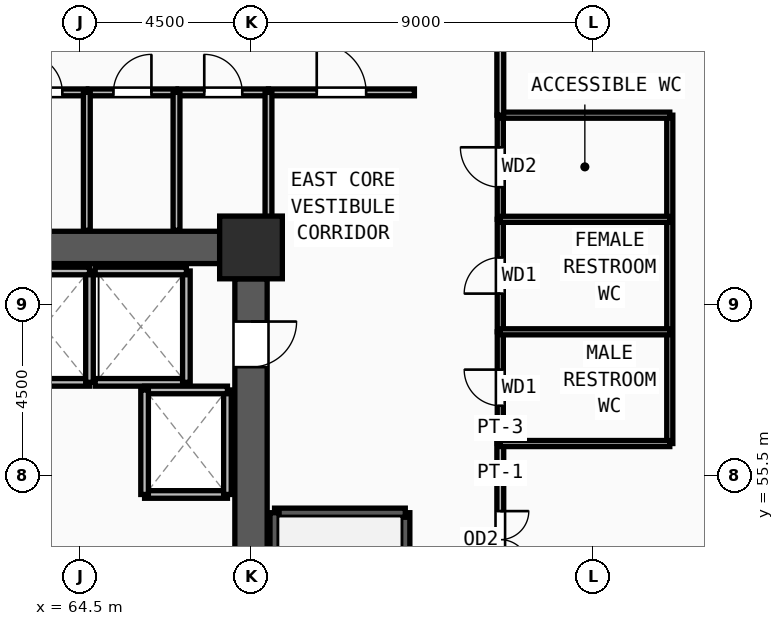
"""IFC4 building model, lengths in metres.
Left out: names, types, materials, properties, quantities, classifications, styles, units other than length and angle.
Written with IfcOpenShell. Run it as: python <this file> out.ifc"""

import sys

from ifc_helpers import new_model, si_unit, direction, frame, frame_2d, origin, origin_2d, place, context, subcontext, project, spatial, rectangle, extrude, source, transform, mapped, element, fill, save


model = new_model("IFC4")
c1 = context("Model", 3, precision=1e-05, world=origin(), true_north=direction((0.0, 1.0)))
c2 = subcontext(c1, "Body", "Model", "MODEL_VIEW")
j1 = project(units=[si_unit("LENGTHUNIT", "METRE"), si_unit("PLANEANGLEUNIT", "RADIAN")], contexts=[c1])
p1 = place(None, origin())
s1 = spatial("IfcSite", under=j1, at=p1, CompositionType="ELEMENT")
p2 = place(p1, origin())
s2 = spatial("IfcBuilding", under=s1, at=p2, CompositionType="ELEMENT")
p3 = place(p2, frame((0.0, 0.0, 85.5)))
s3 = spatial("IfcBuildingStorey", under=s2, at=p3, CompositionType="ELEMENT", Elevation=85.5)
m1 = source(origin(), c2, "Body", "SweptSolid", [
    extrude(rectangle(XDim=1.65, YDim=1.65, at=origin_2d()), origin(), (0.0, 0.0, 1.0), 3.75),
])
p4 = place(p3, frame((69.0, 61.5, 0.0), z_axis=(0.0, 0.0, 1.0), x_axis=(1.0, 0.0, 0.0)))
e1 = element("IfcColumn", 1, at=p4, inside=s3, PredefinedType="COLUMN", context=c2, shape_type="MappedRepresentation", body=[
    mapped(m1, transform((0.0, 0.0, 0.0), x_axis=(1.0, 0.0, 0.0), y_axis=(0.0, 1.0, 0.0), z_axis=(0.0, 0.0, 1.0), scale=1.0)),
])
p5 = place(p3, frame((60.825, 61.5, 0.0), z_axis=(0.0, 0.0, 1.0), x_axis=(1.0, 0.0, 0.0)))
e2 = element("IfcWall", 2, at=p5, inside=s3, PredefinedType="SHEAR", context=c2, shape_type="SweptSolid", body=[
    extrude(rectangle(XDim=7.35, YDim=0.85, at=frame_2d((3.675, 0.0))), origin(), (0.0, 0.0, 1.0), 3.57),
])
p6 = place(p3, frame((69.0, 60.675, 0.0), z_axis=(0.0, 0.0, 1.0), x_axis=(0.0, -1.0, 0.0)))
e3 = element("IfcWall", 3, at=p6, inside=s3, PredefinedType="SHEAR", context=c2, shape_type="SweptSolid", body=[
    extrude(rectangle(XDim=13.35, YDim=0.85, at=frame_2d((6.675, 0.0))), origin(), (0.0, 0.0, 1.0), 3.57),
])
m2 = source(origin(), c2, "Body", "SweptSolid", [
    extrude(rectangle(XDim=1.2, YDim=2.2, at=frame_2d((0.6, 1.1))), frame((0.0, 0.435, 0.0), z_axis=(0.0, -1.0, 0.0), x_axis=(1.0, 0.0, 0.0)), (0.0, 0.0, 1.0), 0.87),
])
p7 = place(p6, frame((1.125, 0.0, 0.0)))
e4 = element("IfcOpeningElement", 4, at=p7, cuts=e3, PredefinedType="OPENING", context=c2, shape_type="MappedRepresentation", body=[
    mapped(m2, transform((0.0, 0.0, 0.0), x_axis=(1.0, 0.0, 0.0), y_axis=(0.0, 1.0, 0.0), z_axis=(0.0, 0.0, 1.0), scale=1.0)),
])
p8 = place(p3, frame((73.06, 46.7, 0.0), z_axis=(0.0, 0.0, 1.0), x_axis=(0.0, 1.0, 0.0)))
e5 = element("IfcWall", 5, at=p8, inside=s3, PredefinedType="SOLIDWALL", context=c2, shape_type="SweptSolid", body=[
    extrude(rectangle(XDim=7.82, YDim=0.24, at=frame_2d((3.91, 0.0))), origin(), (0.0, 0.0, 1.0), 3.57),
])
m3 = source(origin(), c2, "Body", "SweptSolid", [
    extrude(rectangle(XDim=1.2, YDim=2.2, at=frame_2d((0.6, 1.1))), frame((0.0, 0.13, 0.0), z_axis=(0.0, -1.0, 0.0), x_axis=(1.0, 0.0, 0.0)), (0.0, 0.0, 1.0), 0.26),
])
p9 = place(p8, frame((0.32, 0.0, 0.0)))
e6 = element("IfcOpeningElement", 6, at=p9, cuts=e5, PredefinedType="OPENING", context=c2, shape_type="MappedRepresentation", body=[
    mapped(m3, transform((0.0, 0.0, 0.0), x_axis=(1.0, 0.0, 0.0), y_axis=(0.0, 1.0, 0.0), z_axis=(0.0, 0.0, 1.0), scale=1.0)),
])
p10 = place(p3, frame((73.06, 54.52, 0.0), z_axis=(0.0, 0.0, 1.0), x_axis=(-1.0, 0.0, 0.0)))
e7 = element("IfcWall", 7, at=p10, inside=s3, PredefinedType="SOLIDWALL", context=c2, shape_type="SweptSolid", body=[
    extrude(rectangle(XDim=3.44, YDim=0.24, at=frame_2d((1.72, 0.0))), origin(), (0.0, 0.0, 1.0), 3.57),
])
p11 = place(p3, frame((69.62, 54.52, 0.0), z_axis=(0.0, 0.0, 1.0), x_axis=(0.0, -1.0, 0.0)))
e8 = element("IfcWall", 8, at=p11, inside=s3, PredefinedType="SOLIDWALL", context=c2, shape_type="SweptSolid", body=[
    extrude(rectangle(XDim=7.82, YDim=0.24, at=frame_2d((3.91, 0.0))), origin(), (0.0, 0.0, 1.0), 3.57),
])
p12 = place(p3, frame((62.35, 57.95, 0.0), z_axis=(0.0, 0.0, 1.0), x_axis=(1.0, 0.0, 0.0)))
e9 = element("IfcWall", 9, at=p12, inside=s3, PredefinedType="SOLIDWALL", context=c2, shape_type="SweptSolid", body=[
    extrude(rectangle(XDim=2.4, YDim=0.2, at=frame_2d((1.2, 0.0))), origin(), (0.0, 0.0, 1.0), 3.57),
])
p13 = place(p3, frame((64.75, 57.95, 0.0), z_axis=(0.0, 0.0, 1.0), x_axis=(0.0, 1.0, 0.0)))
e10 = element("IfcWall", 10, at=p13, inside=s3, PredefinedType="SOLIDWALL", context=c2, shape_type="SweptSolid", body=[
    extrude(rectangle(XDim=2.93, YDim=0.2, at=frame_2d((1.465, 0.0))), origin(), (0.0, 0.0, 1.0), 3.57),
])
p14 = place(p3, frame((64.75, 60.88, 0.0), z_axis=(0.0, 0.0, 1.0), x_axis=(-1.0, 0.0, 0.0)))
e11 = element("IfcWall", 11, at=p14, inside=s3, PredefinedType="SOLIDWALL", context=c2, shape_type="SweptSolid", body=[
    extrude(rectangle(XDim=2.4, YDim=0.2, at=frame_2d((1.2, 0.0))), origin(), (0.0, 0.0, 1.0), 3.57),
])
p15 = place(p3, frame((64.9, 57.95, 0.0), z_axis=(0.0, 0.0, 1.0), x_axis=(1.0, 0.0, 0.0)))
e12 = element("IfcWall", 12, at=p15, inside=s3, PredefinedType="SOLIDWALL", context=c2, shape_type="SweptSolid", body=[
    extrude(rectangle(XDim=2.4, YDim=0.2, at=frame_2d((1.2, 0.0))), origin(), (0.0, 0.0, 1.0), 3.57),
])
p16 = place(p3, frame((67.3, 57.95, 0.0), z_axis=(0.0, 0.0, 1.0), x_axis=(0.0, 1.0, 0.0)))
e13 = element("IfcWall", 13, at=p16, inside=s3, PredefinedType="SOLIDWALL", context=c2, shape_type="SweptSolid", body=[
    extrude(rectangle(XDim=2.93, YDim=0.2, at=frame_2d((1.465, 0.0))), origin(), (0.0, 0.0, 1.0), 3.57),
])
p17 = place(p3, frame((67.3, 60.88, 0.0), z_axis=(0.0, 0.0, 1.0), x_axis=(-1.0, 0.0, 0.0)))
e14 = element("IfcWall", 14, at=p17, inside=s3, PredefinedType="SOLIDWALL", context=c2, shape_type="SweptSolid", body=[
    extrude(rectangle(XDim=2.4, YDim=0.2, at=frame_2d((1.2, 0.0))), origin(), (0.0, 0.0, 1.0), 3.57),
])
p18 = place(p3, frame((66.2, 55.0, 0.0), z_axis=(0.0, 0.0, 1.0), x_axis=(1.0, 0.0, 0.0)))
e15 = element("IfcWall", 15, at=p18, inside=s3, PredefinedType="SOLIDWALL", context=c2, shape_type="SweptSolid", body=[
    extrude(rectangle(XDim=2.18, YDim=0.2, at=frame_2d((1.09, 0.0))), origin(), (0.0, 0.0, 1.0), 3.57),
])
p19 = place(p3, frame((68.38, 55.0, 0.0), z_axis=(0.0, 0.0, 1.0), x_axis=(0.0, 1.0, 0.0)))
e16 = element("IfcWall", 16, at=p19, inside=s3, PredefinedType="SOLIDWALL", context=c2, shape_type="SweptSolid", body=[
    extrude(rectangle(XDim=2.75, YDim=0.2, at=frame_2d((1.375, 0.0))), origin(), (0.0, 0.0, 1.0), 3.57),
])
p20 = place(p3, frame((68.38, 57.75, 0.0), z_axis=(0.0, 0.0, 1.0), x_axis=(-1.0, 0.0, 0.0)))
e17 = element("IfcWall", 17, at=p20, inside=s3, PredefinedType="SOLIDWALL", context=c2, shape_type="SweptSolid", body=[
    extrude(rectangle(XDim=2.18, YDim=0.2, at=frame_2d((1.09, 0.0))), origin(), (0.0, 0.0, 1.0), 3.57),
])
p21 = place(p3, frame((66.2, 57.75, 0.0), z_axis=(0.0, 0.0, 1.0), x_axis=(0.0, -1.0, 0.0)))
e18 = element("IfcWall", 18, at=p21, inside=s3, PredefinedType="SOLIDWALL", context=c2, shape_type="SweptSolid", body=[
    extrude(rectangle(XDim=2.75, YDim=0.2, at=frame_2d((1.375, 0.0))), origin(), (0.0, 0.0, 1.0), 3.57),
])
p22 = place(p3, frame((75.56, 56.34, 0.0), z_axis=(0.0, 0.0, 1.0), x_axis=(0.0, 1.0, 0.0)))
e19 = element("IfcWall", 19, at=p22, inside=s3, PredefinedType="PARTITIONING", context=c2, shape_type="SweptSolid", body=[
    extrude(rectangle(XDim=2.94, YDim=0.16, at=frame_2d((1.47, 0.0))), origin(), (0.0, 0.0, 1.0), 3.57),
])
m4 = source(origin(), c2, "Body", "SweptSolid", [
    extrude(rectangle(XDim=0.95, YDim=2.15, at=frame_2d((0.475, 1.075))), frame((0.0, 0.09, 0.0), z_axis=(0.0, -1.0, 0.0), x_axis=(1.0, 0.0, 0.0)), (0.0, 0.0, 1.0), 0.18),
])
p23 = place(p22, frame((0.995, 0.0, 0.0)))
e20 = element("IfcOpeningElement", 20, at=p23, cuts=e19, PredefinedType="OPENING", context=c2, shape_type="MappedRepresentation", body=[
    mapped(m4, transform((0.0, 0.0, 0.0), x_axis=(1.0, 0.0, 0.0), y_axis=(0.0, 1.0, 0.0), z_axis=(0.0, 0.0, 1.0), scale=1.0)),
])
p24 = place(p3, frame((75.56, 59.28, 0.0), z_axis=(0.0, 0.0, 1.0), x_axis=(0.0, 1.0, 0.0)))
e21 = element("IfcWall", 21, at=p24, inside=s3, PredefinedType="PARTITIONING", context=c2, shape_type="SweptSolid", body=[
    extrude(rectangle(XDim=2.96, YDim=0.16, at=frame_2d((1.48, 0.0))), origin(), (0.0, 0.0, 1.0), 3.57),
])
p25 = place(p24, frame((1.005, 0.0, 0.0)))
e22 = element("IfcOpeningElement", 22, at=p25, cuts=e21, PredefinedType="OPENING", context=c2, shape_type="MappedRepresentation", body=[
    mapped(m4, transform((0.0, 0.0, 0.0), x_axis=(1.0, 0.0, 0.0), y_axis=(0.0, 1.0, 0.0), z_axis=(0.0, 0.0, 1.0), scale=1.0)),
])
p26 = place(p3, frame((75.56, 62.24, 0.0), z_axis=(0.0, 0.0, 1.0), x_axis=(0.0, 1.0, 0.0)))
e23 = element("IfcWall", 23, at=p26, inside=s3, PredefinedType="PARTITIONING", context=c2, shape_type="SweptSolid", body=[
    extrude(rectangle(XDim=2.74, YDim=0.16, at=frame_2d((1.37, 0.0))), origin(), (0.0, 0.0, 1.0), 3.57),
])
m5 = source(origin(), c2, "Body", "SweptSolid", [
    extrude(rectangle(XDim=1.05, YDim=2.15, at=frame_2d((0.525, 1.075))), frame((0.0, 0.09, 0.0), z_axis=(0.0, -1.0, 0.0), x_axis=(1.0, 0.0, 0.0)), (0.0, 0.0, 1.0), 0.18),
])
p27 = place(p26, frame((0.845, 0.0, 0.0)))
e24 = element("IfcOpeningElement", 24, at=p27, cuts=e23, PredefinedType="OPENING", context=c2, shape_type="MappedRepresentation", body=[
    mapped(m5, transform((0.0, 0.0, 0.0), x_axis=(1.0, 0.0, 0.0), y_axis=(0.0, 1.0, 0.0), z_axis=(0.0, 0.0, 1.0), scale=1.0)),
])
p28 = place(p3, frame((62.39, 65.58, 0.0), z_axis=(0.0, 0.0, 1.0), x_axis=(1.0, 0.0, 0.0)))
e25 = element("IfcWall", 25, at=p28, inside=s3, PredefinedType="PARTITIONING", context=c2, shape_type="SweptSolid", body=[
    extrude(rectangle(XDim=2.29, YDim=0.18, at=frame_2d((1.145, 0.0))), origin(), (0.0, 0.0, 1.0), 3.57),
])
m6 = source(origin(), c2, "Body", "SweptSolid", [
    extrude(rectangle(XDim=1.0, YDim=2.2, at=frame_2d((0.5, 1.1))), frame((0.0, 0.1, 0.0), z_axis=(0.0, -1.0, 0.0), x_axis=(1.0, 0.0, 0.0)), (0.0, 0.0, 1.0), 0.2),
])
p29 = place(p28, frame((0.645, 0.0, 0.0)))
e26 = element("IfcOpeningElement", 26, at=p29, cuts=e25, PredefinedType="OPENING", context=c2, shape_type="MappedRepresentation", body=[
    mapped(m6, transform((0.0, 0.0, 0.0), x_axis=(1.0, 0.0, 0.0), y_axis=(0.0, 1.0, 0.0), z_axis=(0.0, 0.0, 1.0), scale=1.0)),
])
p30 = place(p3, frame((64.72, 65.58, 0.0), z_axis=(0.0, 0.0, 1.0), x_axis=(1.0, 0.0, 0.0)))
e27 = element("IfcWall", 27, at=p30, inside=s3, PredefinedType="PARTITIONING", context=c2, shape_type="SweptSolid", body=[
    extrude(rectangle(XDim=2.32, YDim=0.18, at=frame_2d((1.16, 0.0))), origin(), (0.0, 0.0, 1.0), 3.57),
])
p31 = place(p30, frame((0.66, 0.0, 0.0)))
e28 = element("IfcOpeningElement", 28, at=p31, cuts=e27, PredefinedType="OPENING", context=c2, shape_type="MappedRepresentation", body=[
    mapped(m6, transform((0.0, 0.0, 0.0), x_axis=(1.0, 0.0, 0.0), y_axis=(0.0, 1.0, 0.0), z_axis=(0.0, 0.0, 1.0), scale=1.0)),
])
p32 = place(p3, frame((67.08, 65.58, 0.0), z_axis=(0.0, 0.0, 1.0), x_axis=(1.0, 0.0, 0.0)))
e29 = element("IfcWall", 29, at=p32, inside=s3, PredefinedType="PARTITIONING", context=c2, shape_type="SweptSolid", body=[
    extrude(rectangle(XDim=2.38, YDim=0.18, at=frame_2d((1.19, 0.0))), origin(), (0.0, 0.0, 1.0), 3.57),
])
p33 = place(p32, frame((0.69, 0.0, 0.0)))
e30 = element("IfcOpeningElement", 30, at=p33, cuts=e29, PredefinedType="OPENING", context=c2, shape_type="MappedRepresentation", body=[
    mapped(m6, transform((0.0, 0.0, 0.0), x_axis=(1.0, 0.0, 0.0), y_axis=(0.0, 1.0, 0.0), z_axis=(0.0, 0.0, 1.0), scale=1.0)),
])
p34 = place(p3, frame((69.46, 65.58, 0.0), z_axis=(0.0, 0.0, 1.0), x_axis=(1.0, 0.0, 0.0)))
e31 = element("IfcWall", 31, at=p34, inside=s3, PredefinedType="PARTITIONING", context=c2, shape_type="SweptSolid", body=[
    extrude(rectangle(XDim=3.84, YDim=0.18, at=frame_2d((1.92, 0.0))), origin(), (0.0, 0.0, 1.0), 3.57),
])
m7 = source(origin(), c2, "Body", "SweptSolid", [
    extrude(rectangle(XDim=1.3, YDim=2.2, at=frame_2d((0.65, 1.1))), frame((0.0, 0.1, 0.0), z_axis=(0.0, -1.0, 0.0), x_axis=(1.0, 0.0, 0.0)), (0.0, 0.0, 1.0), 0.2),
])
p35 = place(p34, frame((1.27, 0.0, 0.0)))
e32 = element("IfcOpeningElement", 32, at=p35, cuts=e31, PredefinedType="OPENING", context=c2, shape_type="MappedRepresentation", body=[
    mapped(m7, transform((0.0, 0.0, 0.0), x_axis=(1.0, 0.0, 0.0), y_axis=(0.0, 1.0, 0.0), z_axis=(0.0, 0.0, 1.0), scale=1.0)),
])
p36 = place(p3, frame((75.56, 56.34, 0.0), z_axis=(0.0, 0.0, 1.0), x_axis=(0.0, -1.0, 0.0)))
e33 = element("IfcWall", 33, at=p36, inside=s3, PredefinedType="PARTITIONING", context=c2, shape_type="SweptSolid", body=[
    extrude(rectangle(XDim=5.055, YDim=0.18, at=frame_2d((2.528, 0.0))), origin(), (0.0, 0.0, 1.0), 3.57),
])
m8 = source(origin(), c2, "Body", "SweptSolid", [
    extrude(rectangle(XDim=1.5, YDim=2.2, at=frame_2d((0.75, 1.1))), frame((0.0, 0.1, 0.0), z_axis=(0.0, -1.0, 0.0), x_axis=(1.0, 0.0, 0.0)), (0.0, 0.0, 1.0), 0.2),
])
p37 = place(p36, frame((1.778, 0.0, 0.0)))
e34 = element("IfcOpeningElement", 34, at=p37, cuts=e33, PredefinedType="OPENING", context=c2, shape_type="MappedRepresentation", body=[
    mapped(m8, transform((0.0, 0.0, 0.0), x_axis=(1.0, 0.0, 0.0), y_axis=(0.0, 1.0, 0.0), z_axis=(0.0, 0.0, 1.0), scale=1.0)),
])
p38 = place(p3, frame((80.02, 56.34, 0.0), z_axis=(0.0, 0.0, 1.0), x_axis=(0.0, 1.0, 0.0)))
e35 = element("IfcWall", 35, at=p38, inside=s3, PredefinedType="PARTITIONING", context=c2, shape_type="SweptSolid", body=[
    extrude(rectangle(XDim=8.64, YDim=0.16, at=frame_2d((4.32, 0.0))), origin(), (0.0, 0.0, 1.0), 3.57),
])
for number, where, z_axis, x_axis in (
    (36, (75.56, 56.34, 0.0), (0.0, 0.0, 1.0), (1.0, 0.0, 0.0)),
    (37, (75.56, 59.28, 0.0), (0.0, 0.0, 1.0), (1.0, 0.0, 0.0)),
    (38, (75.56, 62.24, 0.0), (0.0, 0.0, 1.0), (1.0, 0.0, 0.0)),
    (39, (75.56, 64.98, 0.0), (0.0, 0.0, 1.0), (1.0, 0.0, 0.0)),
):
    element("IfcWall", number, at=place(p3, frame(where, z_axis=z_axis, x_axis=x_axis)), inside=s3, PredefinedType="PARTITIONING", context=c2, shape_type="SweptSolid", body=[
        extrude(rectangle(XDim=4.46, YDim=0.16, at=frame_2d((2.23, 0.0))), origin(), (0.0, 0.0, 1.0), 3.57),
    ])
for number, where, z_axis, x_axis in (
    (40, (64.68, 61.95, 0.0), (0.0, 0.0, 1.0), (0.0, 1.0, 0.0)),
    (41, (67.04, 61.95, 0.0), (0.0, 0.0, 1.0), (0.0, 1.0, 0.0)),
    (42, (69.46, 61.95, 0.0), (0.0, 0.0, 1.0), (0.0, 1.0, 0.0)),
):
    element("IfcWall", number, at=place(p3, frame(where, z_axis=z_axis, x_axis=x_axis)), inside=s3, PredefinedType="PARTITIONING", context=c2, shape_type="SweptSolid", body=[
        extrude(rectangle(XDim=3.63, YDim=0.18, at=frame_2d((1.815, 0.0))), origin(), (0.0, 0.0, 1.0), 3.57),
    ])
p39 = place(p3, frame((75.56, 67.215, 0.0), z_axis=(0.0, 0.0, 1.0), x_axis=(0.0, -1.0, 0.0)))
e43 = element("IfcWall", 43, at=p39, inside=s3, PredefinedType="PARTITIONING", context=c2, shape_type="SweptSolid", body=[
    extrude(rectangle(XDim=2.235, YDim=0.18, at=frame_2d((1.118, 0.0))), origin(), (0.0, 0.0, 1.0), 3.57),
])
m9 = source(origin(), c2, "Body", "SweptSolid", [
    extrude(rectangle(XDim=1.2, YDim=2.2, at=frame_2d((0.6, 1.1))), frame((0.0, 0.025, 0.0), z_axis=(0.0, -1.0, 0.0), x_axis=(1.0, 0.0, 0.0)), (0.0, 0.0, 1.0), 0.05),
])
p40 = place(p7, origin())
e44 = element("IfcDoor", 44, at=p40, inside=s3, OperationType="SINGLE_SWING_LEFT", PredefinedType="DOOR", context=c2, shape_type="MappedRepresentation", body=[
    mapped(m9, transform((0.0, 0.0, 0.0), x_axis=(1.0, 0.0, 0.0), y_axis=(0.0, 1.0, 0.0), z_axis=(0.0, 0.0, 1.0), scale=1.0)),
])
fill(e4, e44)
m10 = source(origin(), c2, "Body", "SweptSolid", [
    extrude(rectangle(XDim=0.95, YDim=2.15, at=frame_2d((0.475, 1.075))), frame((0.0, 0.025, 0.0), z_axis=(0.0, -1.0, 0.0), x_axis=(1.0, 0.0, 0.0)), (0.0, 0.0, 1.0), 0.05),
])
p41 = place(p23, origin())
e45 = element("IfcDoor", 45, at=p41, inside=s3, OperationType="SINGLE_SWING_RIGHT", PredefinedType="DOOR", context=c2, shape_type="MappedRepresentation", body=[
    mapped(m10, transform((0.0, 0.0, 0.0), x_axis=(1.0, 0.0, 0.0), y_axis=(0.0, 1.0, 0.0), z_axis=(0.0, 0.0, 1.0), scale=1.0)),
])
fill(e20, e45)
p42 = place(p25, origin())
e46 = element("IfcDoor", 46, at=p42, inside=s3, OperationType="SINGLE_SWING_LEFT", PredefinedType="DOOR", context=c2, shape_type="MappedRepresentation", body=[
    mapped(m10, transform((0.0, 0.0, 0.0), x_axis=(1.0, 0.0, 0.0), y_axis=(0.0, 1.0, 0.0), z_axis=(0.0, 0.0, 1.0), scale=1.0)),
])
fill(e22, e46)
m11 = source(origin(), c2, "Body", "SweptSolid", [
    extrude(rectangle(XDim=1.05, YDim=2.15, at=frame_2d((0.525, 1.075))), frame((0.0, 0.025, 0.0), z_axis=(0.0, -1.0, 0.0), x_axis=(1.0, 0.0, 0.0)), (0.0, 0.0, 1.0), 0.05),
])
p43 = place(p27, origin())
e47 = element("IfcDoor", 47, at=p43, inside=s3, OperationType="SINGLE_SWING_RIGHT", PredefinedType="DOOR", context=c2, shape_type="MappedRepresentation", body=[
    mapped(m11, transform((0.0, 0.0, 0.0), x_axis=(1.0, 0.0, 0.0), y_axis=(0.0, 1.0, 0.0), z_axis=(0.0, 0.0, 1.0), scale=1.0)),
])
fill(e24, e47)
m12 = source(origin(), c2, "Body", "SweptSolid", [
    extrude(rectangle(XDim=1.0, YDim=2.2, at=frame_2d((0.5, 1.1))), frame((0.0, 0.025, 0.0), z_axis=(0.0, -1.0, 0.0), x_axis=(1.0, 0.0, 0.0)), (0.0, 0.0, 1.0), 0.05),
])
p44 = place(p29, origin())
e48 = element("IfcDoor", 48, at=p44, inside=s3, OperationType="SINGLE_SWING_LEFT", PredefinedType="DOOR", context=c2, shape_type="MappedRepresentation", body=[
    mapped(m12, transform((0.0, 0.0, 0.0), x_axis=(1.0, 0.0, 0.0), y_axis=(0.0, 1.0, 0.0), z_axis=(0.0, 0.0, 1.0), scale=1.0)),
])
fill(e26, e48)
p45 = place(p31, origin())
e49 = element("IfcDoor", 49, at=p45, inside=s3, OperationType="SINGLE_SWING_RIGHT", PredefinedType="DOOR", context=c2, shape_type="MappedRepresentation", body=[
    mapped(m12, transform((0.0, 0.0, 0.0), x_axis=(1.0, 0.0, 0.0), y_axis=(0.0, 1.0, 0.0), z_axis=(0.0, 0.0, 1.0), scale=1.0)),
])
fill(e28, e49)
p46 = place(p33, origin())
e50 = element("IfcDoor", 50, at=p46, inside=s3, OperationType="SINGLE_SWING_LEFT", PredefinedType="DOOR", context=c2, shape_type="MappedRepresentation", body=[
    mapped(m12, transform((0.0, 0.0, 0.0), x_axis=(1.0, 0.0, 0.0), y_axis=(0.0, 1.0, 0.0), z_axis=(0.0, 0.0, 1.0), scale=1.0)),
])
fill(e30, e50)
m13 = source(origin(), c2, "Body", "SweptSolid", [
    extrude(rectangle(XDim=1.3, YDim=2.2, at=frame_2d((0.65, 1.1))), frame((0.0, 0.025, 0.0), z_axis=(0.0, -1.0, 0.0), x_axis=(1.0, 0.0, 0.0)), (0.0, 0.0, 1.0), 0.05),
])
p47 = place(p35, origin())
e51 = element("IfcDoor", 51, at=p47, inside=s3, OperationType="SINGLE_SWING_LEFT", PredefinedType="DOOR", context=c2, shape_type="MappedRepresentation", body=[
    mapped(m13, transform((0.0, 0.0, 0.0), x_axis=(1.0, 0.0, 0.0), y_axis=(0.0, 1.0, 0.0), z_axis=(0.0, 0.0, 1.0), scale=1.0)),
])
fill(e32, e51)
m14 = source(origin(), c2, "Body", "SweptSolid", [
    extrude(rectangle(XDim=1.5, YDim=2.2, at=frame_2d((0.75, 1.1))), frame((0.0, 0.025, 0.0), z_axis=(0.0, -1.0, 0.0), x_axis=(1.0, 0.0, 0.0)), (0.0, 0.0, 1.0), 0.05),
])
p48 = place(p37, origin())
e52 = element("IfcDoor", 52, at=p48, inside=s3, OperationType="DOUBLE_DOOR_SINGLE_SWING", PredefinedType="DOOR", context=c2, shape_type="MappedRepresentation", body=[
    mapped(m14, transform((0.0, 0.0, 0.0), x_axis=(1.0, 0.0, 0.0), y_axis=(0.0, 1.0, 0.0), z_axis=(0.0, 0.0, 1.0), scale=1.0)),
])
fill(e34, e52)
save(model, sys.argv[1])
